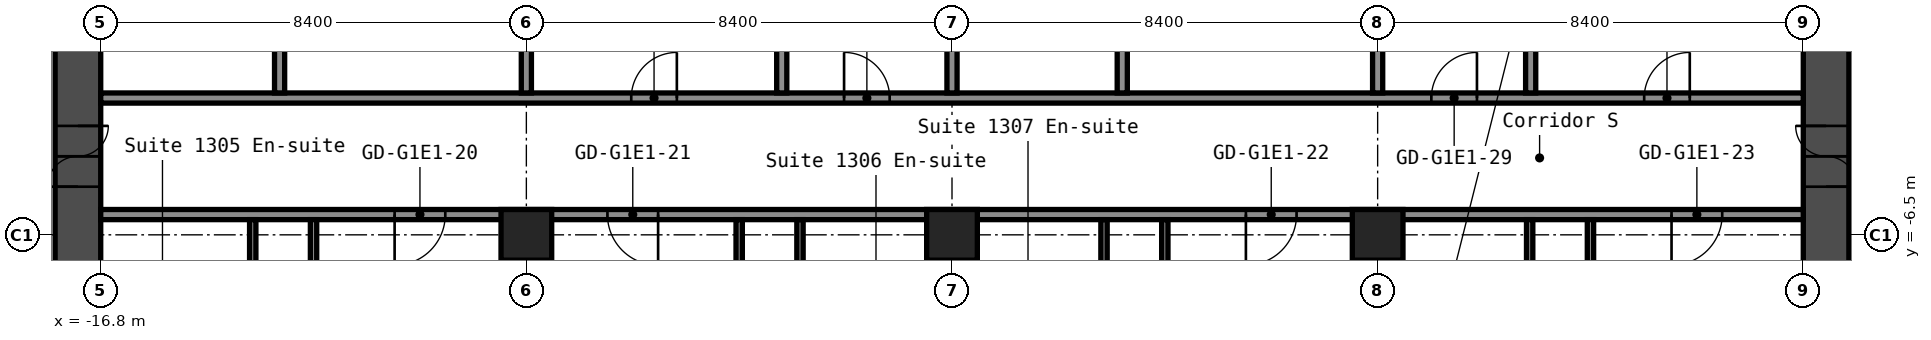
"""IFC4 building model, lengths in metres.
Left out: names, types, materials, properties, quantities, classifications, styles, units other than length and angle.
Written with IfcOpenShell. Run it as: python <this file> out.ifc"""

import sys

from ifc_helpers import new_model, si_unit, direction, frame, frame_2d, origin, origin_2d, place, context, subcontext, project, spatial, rectangle, hollow_rectangle, extrude, element, fill, save


model = new_model("IFC4")
c1 = context("Model", 3, precision=1e-05, world=origin(), true_north=direction((0.0, 1.0)))
c2 = subcontext(c1, "Body", "Model", "MODEL_VIEW")
j1 = project(units=[si_unit("LENGTHUNIT", "METRE"), si_unit("PLANEANGLEUNIT", "RADIAN")], contexts=[c1])
p1 = place(None, origin())
s1 = spatial("IfcSite", under=j1, at=p1, CompositionType="ELEMENT")
p2 = place(p1, origin())
s2 = spatial("IfcBuilding", under=s1, at=p2, CompositionType="ELEMENT")
p3 = place(p2, frame((0.0, 0.0, 48.6)))
s3 = spatial("IfcBuildingStorey", under=s2, at=p3, CompositionType="ELEMENT", Elevation=48.6)
for number, where, z_axis, x_axis in (
    (1, (-8.4, -6.5, 0.0), (0.0, 0.0, 1.0), (1.0, 0.0, 0.0)),
    (2, (0.0, -6.5, 0.0), (0.0, 0.0, 1.0), (1.0, 0.0, 0.0)),
    (3, (8.4, -6.5, 0.0), (0.0, 0.0, 1.0), (1.0, 0.0, 0.0)),
):
    element("IfcColumn", number, at=place(p3, frame(where, z_axis=z_axis, x_axis=x_axis)), inside=s3, PredefinedType="COLUMN", context=c2, shape_type="SweptSolid", body=[
        extrude(hollow_rectangle(XDim=1.0, YDim=1.0, WallThickness=0.04, at=origin_2d()), origin(), (0.0, 0.0, 1.0), 2.8),
    ])
p4 = place(p3, frame((-17.25, -8.4, 0.0), z_axis=(0.0, 0.0, 1.0), x_axis=(0.0, 1.0, 0.0)))
e4 = element("IfcWall", 4, at=p4, inside=s3, PredefinedType="SHEAR", context=c2, shape_type="SweptSolid", body=[
    extrude(rectangle(XDim=16.8, YDim=0.9, at=frame_2d((8.4, 0.0))), origin(), (0.0, 0.0, 1.0), 2.8),
])
p5 = place(p4, frame((12.75, 0.0, 0.0)))
e5 = element("IfcOpeningElement", 5, at=p5, cuts=e4, PredefinedType="OPENING", context=c2, shape_type="SweptSolid", body=[
    extrude(rectangle(XDim=1.2, YDim=2.1, at=frame_2d((0.6, 1.05))), frame((0.0, 0.46, 0.0), z_axis=(0.0, -1.0, 0.0), x_axis=(1.0, 0.0, 0.0)), (0.0, 0.0, 1.0), 0.92),
])
p6 = place(p4, frame((2.85, 0.0, 0.0)))
e6 = element("IfcOpeningElement", 6, at=p6, cuts=e4, PredefinedType="OPENING", context=c2, shape_type="SweptSolid", body=[
    extrude(rectangle(XDim=1.2, YDim=2.1, at=frame_2d((0.6, 1.05))), frame((0.0, 0.46, 0.0), z_axis=(0.0, -1.0, 0.0), x_axis=(1.0, 0.0, 0.0)), (0.0, 0.0, 1.0), 0.92),
])
p7 = place(p3, frame((17.25, -8.4, 0.0), z_axis=(0.0, 0.0, 1.0), x_axis=(0.0, 1.0, 0.0)))
e7 = element("IfcWall", 7, at=p7, inside=s3, PredefinedType="SHEAR", context=c2, shape_type="SweptSolid", body=[
    extrude(rectangle(XDim=16.8, YDim=0.9, at=frame_2d((8.4, 0.0))), origin(), (0.0, 0.0, 1.0), 2.8),
])
p8 = place(p7, frame((12.75, 0.0, 0.0)))
e8 = element("IfcOpeningElement", 8, at=p8, cuts=e7, PredefinedType="OPENING", context=c2, shape_type="SweptSolid", body=[
    extrude(rectangle(XDim=1.2, YDim=2.1, at=frame_2d((0.6, 1.05))), frame((0.0, 0.46, 0.0), z_axis=(0.0, -1.0, 0.0), x_axis=(1.0, 0.0, 0.0)), (0.0, 0.0, 1.0), 0.92),
])
p9 = place(p7, frame((2.85, 0.0, 0.0)))
e9 = element("IfcOpeningElement", 9, at=p9, cuts=e7, PredefinedType="OPENING", context=c2, shape_type="SweptSolid", body=[
    extrude(rectangle(XDim=1.2, YDim=2.1, at=frame_2d((0.6, 1.05))), frame((0.0, 0.46, 0.0), z_axis=(0.0, -1.0, 0.0), x_axis=(1.0, 0.0, 0.0)), (0.0, 0.0, 1.0), 0.92),
])
p10 = place(p3, frame((-16.8, -6.1, 0.0), z_axis=(0.0, 0.0, 1.0), x_axis=(1.0, 0.0, 0.0)))
e10 = element("IfcWall", 10, at=p10, inside=s3, PredefinedType="PARTITIONING", context=c2, shape_type="SweptSolid", body=[
    extrude(rectangle(XDim=33.6, YDim=0.2, at=frame_2d((16.8, 0.0))), origin(), (0.0, 0.0, 1.0), 2.8),
])
p11 = place(p10, frame((5.8, 0.0, 0.0)))
e11 = element("IfcOpeningElement", 11, at=p11, cuts=e10, PredefinedType="OPENING", context=c2, shape_type="SweptSolid", body=[
    extrude(rectangle(XDim=1.0, YDim=2.1, at=frame_2d((0.5, 1.05))), frame((0.0, 0.11, 0.0), z_axis=(0.0, -1.0, 0.0), x_axis=(1.0, 0.0, 0.0)), (0.0, 0.0, 1.0), 0.22),
])
p12 = place(p10, frame((10.0, 0.0, 0.0)))
e12 = element("IfcOpeningElement", 12, at=p12, cuts=e10, PredefinedType="OPENING", context=c2, shape_type="SweptSolid", body=[
    extrude(rectangle(XDim=1.0, YDim=2.1, at=frame_2d((0.5, 1.05))), frame((0.0, 0.11, 0.0), z_axis=(0.0, -1.0, 0.0), x_axis=(1.0, 0.0, 0.0)), (0.0, 0.0, 1.0), 0.22),
])
p13 = place(p10, frame((22.6, 0.0, 0.0)))
e13 = element("IfcOpeningElement", 13, at=p13, cuts=e10, PredefinedType="OPENING", context=c2, shape_type="SweptSolid", body=[
    extrude(rectangle(XDim=1.0, YDim=2.1, at=frame_2d((0.5, 1.05))), frame((0.0, 0.11, 0.0), z_axis=(0.0, -1.0, 0.0), x_axis=(1.0, 0.0, 0.0)), (0.0, 0.0, 1.0), 0.22),
])
p14 = place(p10, frame((31.0, 0.0, 0.0)))
e14 = element("IfcOpeningElement", 14, at=p14, cuts=e10, PredefinedType="OPENING", context=c2, shape_type="SweptSolid", body=[
    extrude(rectangle(XDim=1.0, YDim=2.1, at=frame_2d((0.5, 1.05))), frame((0.0, 0.11, 0.0), z_axis=(0.0, -1.0, 0.0), x_axis=(1.0, 0.0, 0.0)), (0.0, 0.0, 1.0), 0.22),
])
p15 = place(p3, frame((-16.8, -3.8, 0.0), z_axis=(0.0, 0.0, 1.0), x_axis=(1.0, 0.0, 0.0)))
e15 = element("IfcWall", 15, at=p15, inside=s3, PredefinedType="PARTITIONING", context=c2, shape_type="SweptSolid", body=[
    extrude(rectangle(XDim=33.6, YDim=0.2, at=frame_2d((16.8, 0.0))), origin(), (0.0, 0.0, 1.0), 2.8),
])
p16 = place(p15, frame((10.47, 0.0, 0.0)))
e16 = element("IfcOpeningElement", 16, at=p16, cuts=e15, PredefinedType="OPENING", context=c2, shape_type="SweptSolid", body=[
    extrude(rectangle(XDim=0.9, YDim=2.1, at=frame_2d((0.45, 1.05))), frame((0.0, 0.11, 0.0), z_axis=(0.0, -1.0, 0.0), x_axis=(1.0, 0.0, 0.0)), (0.0, 0.0, 1.0), 0.22),
])
p17 = place(p15, frame((14.67, 0.0, 0.0)))
e17 = element("IfcOpeningElement", 17, at=p17, cuts=e15, PredefinedType="OPENING", context=c2, shape_type="SweptSolid", body=[
    extrude(rectangle(XDim=0.9, YDim=2.1, at=frame_2d((0.45, 1.05))), frame((0.0, 0.11, 0.0), z_axis=(0.0, -1.0, 0.0), x_axis=(1.0, 0.0, 0.0)), (0.0, 0.0, 1.0), 0.22),
])
p18 = place(p15, frame((26.26, 0.0, 0.0)))
e18 = element("IfcOpeningElement", 18, at=p18, cuts=e15, PredefinedType="OPENING", context=c2, shape_type="SweptSolid", body=[
    extrude(rectangle(XDim=0.9, YDim=2.1, at=frame_2d((0.45, 1.05))), frame((0.0, 0.11, 0.0), z_axis=(0.0, -1.0, 0.0), x_axis=(1.0, 0.0, 0.0)), (0.0, 0.0, 1.0), 0.22),
])
p19 = place(p15, frame((30.46, 0.0, 0.0)))
e19 = element("IfcOpeningElement", 19, at=p19, cuts=e15, PredefinedType="OPENING", context=c2, shape_type="SweptSolid", body=[
    extrude(rectangle(XDim=0.9, YDim=2.1, at=frame_2d((0.45, 1.05))), frame((0.0, 0.11, 0.0), z_axis=(0.0, -1.0, 0.0), x_axis=(1.0, 0.0, 0.0)), (0.0, 0.0, 1.0), 0.22),
])
p20 = place(p3, frame((-13.8, -9.3, 0.0), z_axis=(0.0, 0.0, 1.0), x_axis=(0.0, 1.0, 0.0)))
e20 = element("IfcWall", 20, at=p20, inside=s3, PredefinedType="PARTITIONING", context=c2, shape_type="SweptSolid", body=[
    extrude(rectangle(XDim=3.1, YDim=0.125, at=frame_2d((1.55, 0.0))), origin(), (0.0, 0.0, 1.0), 2.8),
])
p21 = place(p3, frame((-13.27, -3.7, 0.0), z_axis=(0.0, 0.0, 1.0), x_axis=(0.0, 1.0, 0.0)))
e21 = element("IfcWall", 21, at=p21, inside=s3, PredefinedType="PARTITIONING", context=c2, shape_type="SweptSolid", body=[
    extrude(rectangle(XDim=7.4, YDim=0.2, at=frame_2d((3.7, 0.0))), origin(), (0.0, 0.0, 1.0), 2.8),
])
p22 = place(p3, frame((-12.6, -20.3, 0.0), z_axis=(0.0, 0.0, 1.0), x_axis=(0.0, 1.0, 0.0)))
e22 = element("IfcWall", 22, at=p22, inside=s3, PredefinedType="PARTITIONING", context=c2, shape_type="SweptSolid", body=[
    extrude(rectangle(XDim=14.1, YDim=0.125, at=frame_2d((7.05, 0.0))), origin(), (0.0, 0.0, 1.0), 2.8),
])
p23 = place(p22, frame((9.15, 0.0, 0.0)))
e23 = element("IfcOpeningElement", 23, at=p23, cuts=e22, PredefinedType="OPENING", context=c2, shape_type="SweptSolid", body=[
    extrude(rectangle(XDim=0.9, YDim=2.1, at=frame_2d((0.45, 1.05))), frame((0.0, 0.073, 0.0), z_axis=(0.0, -1.0, 0.0), x_axis=(1.0, 0.0, 0.0)), (0.0, 0.0, 1.0), 0.145),
])
p24 = place(p3, frame((-8.4, -20.3, 0.0), z_axis=(0.0, 0.0, 1.0), x_axis=(0.0, 1.0, 0.0)))
e24 = element("IfcWall", 24, at=p24, inside=s3, PredefinedType="PARTITIONING", context=c2, shape_type="SweptSolid", body=[
    extrude(rectangle(XDim=13.31, YDim=0.2, at=frame_2d((6.655, 0.0))), origin(), (0.0, 0.0, 1.0), 2.8),
])
p25 = place(p3, frame((-8.4, -3.7, 0.0), z_axis=(0.0, 0.0, 1.0), x_axis=(0.0, 1.0, 0.0)))
e25 = element("IfcWall", 25, at=p25, inside=s3, PredefinedType="PARTITIONING", context=c2, shape_type="SweptSolid", body=[
    extrude(rectangle(XDim=7.4, YDim=0.2, at=frame_2d((3.7, 0.0))), origin(), (0.0, 0.0, 1.0), 2.8),
])
p26 = place(p3, frame((-4.2, -20.3, 0.0), z_axis=(0.0, 0.0, 1.0), x_axis=(0.0, 1.0, 0.0)))
e26 = element("IfcWall", 26, at=p26, inside=s3, PredefinedType="PARTITIONING", context=c2, shape_type="SweptSolid", body=[
    extrude(rectangle(XDim=14.1, YDim=0.125, at=frame_2d((7.05, 0.0))), origin(), (0.0, 0.0, 1.0), 2.8),
])
p27 = place(p26, frame((9.15, 0.0, 0.0)))
e27 = element("IfcOpeningElement", 27, at=p27, cuts=e26, PredefinedType="OPENING", context=c2, shape_type="SweptSolid", body=[
    extrude(rectangle(XDim=0.9, YDim=2.1, at=frame_2d((0.45, 1.05))), frame((0.0, 0.073, 0.0), z_axis=(0.0, -1.0, 0.0), x_axis=(1.0, 0.0, 0.0)), (0.0, 0.0, 1.0), 0.145),
])
p28 = place(p3, frame((-3.36, -3.7, 0.0), z_axis=(0.0, 0.0, 1.0), x_axis=(0.0, 1.0, 0.0)))
e28 = element("IfcWall", 28, at=p28, inside=s3, PredefinedType="PARTITIONING", context=c2, shape_type="SweptSolid", body=[
    extrude(rectangle(XDim=7.4, YDim=0.2, at=frame_2d((3.7, 0.0))), origin(), (0.0, 0.0, 1.0), 2.8),
])
p29 = place(p3, frame((-3.0, -9.3, 0.0), z_axis=(0.0, 0.0, 1.0), x_axis=(0.0, 1.0, 0.0)))
e29 = element("IfcWall", 29, at=p29, inside=s3, PredefinedType="PARTITIONING", context=c2, shape_type="SweptSolid", body=[
    extrude(rectangle(XDim=3.1, YDim=0.125, at=frame_2d((1.55, 0.0))), origin(), (0.0, 0.0, 1.0), 2.8),
])
p30 = place(p3, frame((0.0, -20.3, 0.0), z_axis=(0.0, 0.0, 1.0), x_axis=(0.0, 1.0, 0.0)))
e30 = element("IfcWall", 30, at=p30, inside=s3, PredefinedType="PARTITIONING", context=c2, shape_type="SweptSolid", body=[
    extrude(rectangle(XDim=13.31, YDim=0.2, at=frame_2d((6.655, 0.0))), origin(), (0.0, 0.0, 1.0), 2.8),
])
p31 = place(p3, frame((0.0, -3.7, 0.0), z_axis=(0.0, 0.0, 1.0), x_axis=(0.0, 1.0, 0.0)))
e31 = element("IfcWall", 31, at=p31, inside=s3, PredefinedType="PARTITIONING", context=c2, shape_type="SweptSolid", body=[
    extrude(rectangle(XDim=7.4, YDim=0.2, at=frame_2d((3.7, 0.0))), origin(), (0.0, 0.0, 1.0), 2.8),
])
p32 = place(p3, frame((3.0, -9.3, 0.0), z_axis=(0.0, 0.0, 1.0), x_axis=(0.0, 1.0, 0.0)))
e32 = element("IfcWall", 32, at=p32, inside=s3, PredefinedType="PARTITIONING", context=c2, shape_type="SweptSolid", body=[
    extrude(rectangle(XDim=3.1, YDim=0.125, at=frame_2d((1.55, 0.0))), origin(), (0.0, 0.0, 1.0), 2.8),
])
p33 = place(p3, frame((3.36, -3.7, 0.0), z_axis=(0.0, 0.0, 1.0), x_axis=(0.0, 1.0, 0.0)))
e33 = element("IfcWall", 33, at=p33, inside=s3, PredefinedType="PARTITIONING", context=c2, shape_type="SweptSolid", body=[
    extrude(rectangle(XDim=7.4, YDim=0.2, at=frame_2d((3.7, 0.0))), origin(), (0.0, 0.0, 1.0), 2.8),
])
p34 = place(p3, frame((4.2, -20.3, 0.0), z_axis=(0.0, 0.0, 1.0), x_axis=(0.0, 1.0, 0.0)))
e34 = element("IfcWall", 34, at=p34, inside=s3, PredefinedType="PARTITIONING", context=c2, shape_type="SweptSolid", body=[
    extrude(rectangle(XDim=14.1, YDim=0.125, at=frame_2d((7.05, 0.0))), origin(), (0.0, 0.0, 1.0), 2.8),
])
p35 = place(p34, frame((9.15, 0.0, 0.0)))
e35 = element("IfcOpeningElement", 35, at=p35, cuts=e34, PredefinedType="OPENING", context=c2, shape_type="SweptSolid", body=[
    extrude(rectangle(XDim=0.9, YDim=2.1, at=frame_2d((0.45, 1.05))), frame((0.0, 0.073, 0.0), z_axis=(0.0, -1.0, 0.0), x_axis=(1.0, 0.0, 0.0)), (0.0, 0.0, 1.0), 0.145),
])
p36 = place(p3, frame((8.4, -20.3, 0.0), z_axis=(0.0, 0.0, 1.0), x_axis=(0.0, 1.0, 0.0)))
e36 = element("IfcWall", 36, at=p36, inside=s3, PredefinedType="PARTITIONING", context=c2, shape_type="SweptSolid", body=[
    extrude(rectangle(XDim=13.31, YDim=0.2, at=frame_2d((6.655, 0.0))), origin(), (0.0, 0.0, 1.0), 2.8),
])
p37 = place(p3, frame((8.4, -3.7, 0.0), z_axis=(0.0, 0.0, 1.0), x_axis=(0.0, 1.0, 0.0)))
e37 = element("IfcWall", 37, at=p37, inside=s3, PredefinedType="PARTITIONING", context=c2, shape_type="SweptSolid", body=[
    extrude(rectangle(XDim=7.4, YDim=0.2, at=frame_2d((3.7, 0.0))), origin(), (0.0, 0.0, 1.0), 2.8),
])
p38 = place(p3, frame((11.4, -9.3, 0.0), z_axis=(0.0, 0.0, 1.0), x_axis=(0.0, 1.0, 0.0)))
e38 = element("IfcWall", 38, at=p38, inside=s3, PredefinedType="PARTITIONING", context=c2, shape_type="SweptSolid", body=[
    extrude(rectangle(XDim=3.1, YDim=0.125, at=frame_2d((1.55, 0.0))), origin(), (0.0, 0.0, 1.0), 2.8),
])
p39 = place(p3, frame((11.42, -3.7, 0.0), z_axis=(0.0, 0.0, 1.0), x_axis=(0.0, 1.0, 0.0)))
e39 = element("IfcWall", 39, at=p39, inside=s3, PredefinedType="PARTITIONING", context=c2, shape_type="SweptSolid", body=[
    extrude(rectangle(XDim=7.4, YDim=0.2, at=frame_2d((3.7, 0.0))), origin(), (0.0, 0.0, 1.0), 2.8),
])
p40 = place(p3, frame((12.6, -20.3, 0.0), z_axis=(0.0, 0.0, 1.0), x_axis=(0.0, 1.0, 0.0)))
e40 = element("IfcWall", 40, at=p40, inside=s3, PredefinedType="PARTITIONING", context=c2, shape_type="SweptSolid", body=[
    extrude(rectangle(XDim=14.1, YDim=0.125, at=frame_2d((7.05, 0.0))), origin(), (0.0, 0.0, 1.0), 2.8),
])
p41 = place(p40, frame((9.15, 0.0, 0.0)))
e41 = element("IfcOpeningElement", 41, at=p41, cuts=e40, PredefinedType="OPENING", context=c2, shape_type="SweptSolid", body=[
    extrude(rectangle(XDim=0.9, YDim=2.1, at=frame_2d((0.45, 1.05))), frame((0.0, 0.073, 0.0), z_axis=(0.0, -1.0, 0.0), x_axis=(1.0, 0.0, 0.0)), (0.0, 0.0, 1.0), 0.145),
])
p42 = place(p6, origin())
e42 = element("IfcDoor", 42, at=p42, inside=s3, OperationType="DOUBLE_DOOR_SINGLE_SWING", PredefinedType="DOOR", context=c2, shape_type="SweptSolid", body=[
    extrude(rectangle(XDim=1.2, YDim=2.1, at=frame_2d((0.6, 1.05))), frame((0.0, 0.025, 0.0), z_axis=(0.0, -1.0, 0.0), x_axis=(1.0, 0.0, 0.0)), (0.0, 0.0, 1.0), 0.05),
])
fill(e6, e42)
p43 = place(p9, origin())
e43 = element("IfcDoor", 43, at=p43, inside=s3, OperationType="DOUBLE_DOOR_SINGLE_SWING", PredefinedType="DOOR", context=c2, shape_type="SweptSolid", body=[
    extrude(rectangle(XDim=1.2, YDim=2.1, at=frame_2d((0.6, 1.05))), frame((0.0, 0.025, 0.0), z_axis=(0.0, -1.0, 0.0), x_axis=(1.0, 0.0, 0.0)), (0.0, 0.0, 1.0), 0.05),
])
fill(e9, e43)
p44 = place(p11, origin())
e44 = element("IfcDoor", 44, at=p44, inside=s3, OperationType="SINGLE_SWING_LEFT", PredefinedType="DOOR", context=c2, shape_type="SweptSolid", body=[
    extrude(rectangle(XDim=1.0, YDim=2.1, at=frame_2d((0.5, 1.05))), frame((0.0, 0.025, 0.0), z_axis=(0.0, -1.0, 0.0), x_axis=(1.0, 0.0, 0.0)), (0.0, 0.0, 1.0), 0.05),
])
fill(e11, e44)
p45 = place(p12, origin())
e45 = element("IfcDoor", 45, at=p45, inside=s3, OperationType="SINGLE_SWING_RIGHT", PredefinedType="DOOR", context=c2, shape_type="SweptSolid", body=[
    extrude(rectangle(XDim=1.0, YDim=2.1, at=frame_2d((0.5, 1.05))), frame((0.0, 0.025, 0.0), z_axis=(0.0, -1.0, 0.0), x_axis=(1.0, 0.0, 0.0)), (0.0, 0.0, 1.0), 0.05),
])
fill(e12, e45)
p46 = place(p13, origin())
e46 = element("IfcDoor", 46, at=p46, inside=s3, OperationType="SINGLE_SWING_LEFT", PredefinedType="DOOR", context=c2, shape_type="SweptSolid", body=[
    extrude(rectangle(XDim=1.0, YDim=2.1, at=frame_2d((0.5, 1.05))), frame((0.0, 0.025, 0.0), z_axis=(0.0, -1.0, 0.0), x_axis=(1.0, 0.0, 0.0)), (0.0, 0.0, 1.0), 0.05),
])
fill(e13, e46)
p47 = place(p14, origin())
e47 = element("IfcDoor", 47, at=p47, inside=s3, OperationType="SINGLE_SWING_LEFT", PredefinedType="DOOR", context=c2, shape_type="SweptSolid", body=[
    extrude(rectangle(XDim=1.0, YDim=2.1, at=frame_2d((0.5, 1.05))), frame((0.0, 0.025, 0.0), z_axis=(0.0, -1.0, 0.0), x_axis=(1.0, 0.0, 0.0)), (0.0, 0.0, 1.0), 0.05),
])
fill(e14, e47)
p48 = place(p16, origin())
e48 = element("IfcDoor", 48, at=p48, inside=s3, OperationType="SINGLE_SWING_LEFT", PredefinedType="DOOR", context=c2, shape_type="SweptSolid", body=[
    extrude(rectangle(XDim=0.9, YDim=2.1, at=frame_2d((0.45, 1.05))), frame((0.0, 0.025, 0.0), z_axis=(0.0, -1.0, 0.0), x_axis=(1.0, 0.0, 0.0)), (0.0, 0.0, 1.0), 0.05),
])
fill(e16, e48)
p49 = place(p17, origin())
e49 = element("IfcDoor", 49, at=p49, inside=s3, OperationType="SINGLE_SWING_RIGHT", PredefinedType="DOOR", context=c2, shape_type="SweptSolid", body=[
    extrude(rectangle(XDim=0.9, YDim=2.1, at=frame_2d((0.45, 1.05))), frame((0.0, 0.025, 0.0), z_axis=(0.0, -1.0, 0.0), x_axis=(1.0, 0.0, 0.0)), (0.0, 0.0, 1.0), 0.05),
])
fill(e17, e49)
p50 = place(p18, origin())
e50 = element("IfcDoor", 50, at=p50, inside=s3, OperationType="SINGLE_SWING_LEFT", PredefinedType="DOOR", context=c2, shape_type="SweptSolid", body=[
    extrude(rectangle(XDim=0.9, YDim=2.1, at=frame_2d((0.45, 1.05))), frame((0.0, 0.025, 0.0), z_axis=(0.0, -1.0, 0.0), x_axis=(1.0, 0.0, 0.0)), (0.0, 0.0, 1.0), 0.05),
])
fill(e18, e50)
p51 = place(p19, origin())
e51 = element("IfcDoor", 51, at=p51, inside=s3, OperationType="SINGLE_SWING_LEFT", PredefinedType="DOOR", context=c2, shape_type="SweptSolid", body=[
    extrude(rectangle(XDim=0.9, YDim=2.1, at=frame_2d((0.45, 1.05))), frame((0.0, 0.025, 0.0), z_axis=(0.0, -1.0, 0.0), x_axis=(1.0, 0.0, 0.0)), (0.0, 0.0, 1.0), 0.05),
])
fill(e19, e51)
save(model, sys.argv[1])
